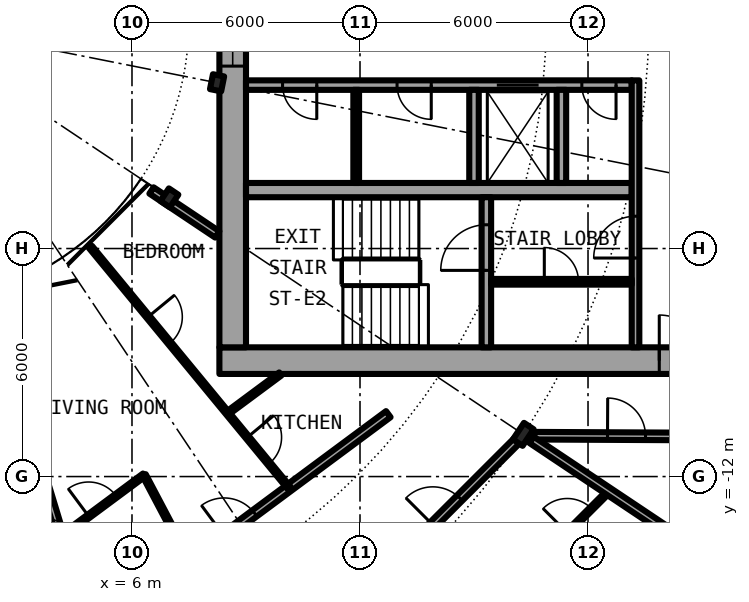
"""IFC4 building model, lengths in metres.
Left out: names, types, materials, properties, quantities, classifications, styles, units other than length and angle.
Written with IfcOpenShell. Run it as: python <this file> out.ifc"""

import sys

from ifc_helpers import new_model, si_unit, direction, frame, frame_2d, origin, origin_2d, place, context, subcontext, project, spatial, rectangle, i_section, extrude, element, fill, save


model = new_model("IFC4")
c1 = context("Model", 3, precision=1e-05, world=origin(), true_north=direction((0.0, 1.0)))
c2 = subcontext(c1, "Body", "Model", "MODEL_VIEW")
j1 = project(units=[si_unit("LENGTHUNIT", "METRE"), si_unit("PLANEANGLEUNIT", "RADIAN")], contexts=[c1])
p1 = place(None, origin())
s1 = spatial("IfcSite", under=j1, at=p1, CompositionType="ELEMENT")
p2 = place(p1, origin())
s2 = spatial("IfcBuilding", under=s1, at=p2, CompositionType="ELEMENT")
p3 = place(p2, frame((0.0, 0.0, 88.0)))
s3 = spatial("IfcBuildingStorey", under=s2, at=p3, CompositionType="ELEMENT", Elevation=88.0)
p4 = place(p3, frame((16.297, -10.889, 0.0), z_axis=(0.0, 0.0, 1.0), x_axis=(0.831469612303, -0.55557023302, 0.0)))
e1 = element("IfcColumn", 1, at=p4, inside=s3, PredefinedType="COLUMN", context=c2, shape_type="SweptSolid", body=[
    extrude(i_section(OverallWidth=0.306, OverallDepth=0.524, WebThickness=0.021, FlangeThickness=0.04, FilletRadius=0.027, at=origin_2d()), origin(), (0.0, 0.0, 1.0), 3.05),
])
for number, where, z_axis, x_axis in (
    (2, (6.984, -4.667, 0.0), (0.0, 0.0, 1.0), (0.831, -0.556, 0.0)),
    (3, (8.239, -1.639, 0.0), (0.0, 0.0, 1.0), (0.981, -0.195, 0.0)),
):
    element("IfcColumn", number, at=place(p3, frame(where, z_axis=z_axis, x_axis=x_axis)), inside=s3, PredefinedType="COLUMN", context=c2, shape_type="SweptSolid", body=[
        extrude(i_section(OverallWidth=0.3, OverallDepth=0.4, WebThickness=0.013, FlangeThickness=0.024, FilletRadius=0.027, at=origin_2d()), origin(), (0.0, 0.0, 1.0), 3.05),
    ])
p5 = place(p3, frame((8.3, -8.95, 0.0), z_axis=(0.0, 0.0, 1.0), x_axis=(1.0, 0.0, 0.0)))
e4 = element("IfcWall", 4, at=p5, inside=s3, PredefinedType="SHEAR", context=c2, shape_type="SweptSolid", body=[
    extrude(rectangle(XDim=14.0, YDim=0.7, at=frame_2d((7.0, 0.0))), origin(), (0.0, 0.0, 1.0), 3.05),
])
p6 = place(p5, frame((11.575, 0.0, 0.0)))
e5 = element("IfcOpeningElement", 5, at=p6, cuts=e4, PredefinedType="OPENING", context=c2, shape_type="SweptSolid", body=[
    extrude(rectangle(XDim=1.2, YDim=2.3, at=frame_2d((0.6, 1.15))), frame((0.0, 0.36, 0.0), z_axis=(0.0, -1.0, 0.0), x_axis=(1.0, 0.0, 0.0)), (0.0, 0.0, 1.0), 0.72),
])
p7 = place(p3, frame((8.65, -8.6, 0.0), z_axis=(0.0, 0.0, 1.0), x_axis=(0.0, 1.0, 0.0)))
e6 = element("IfcWall", 6, at=p7, inside=s3, PredefinedType="SHEAR", context=c2, shape_type="SweptSolid", body=[
    extrude(rectangle(XDim=17.2, YDim=0.7, at=frame_2d((8.6, 0.0))), origin(), (0.0, 0.0, 1.0), 3.05),
])
p8 = place(p7, frame((7.4, 0.0, 0.1)))
e7 = element("IfcOpeningElement", 7, at=p8, cuts=e6, PredefinedType="OPENING", context=c2, shape_type="SweptSolid", body=[
    extrude(rectangle(XDim=2.4, YDim=2.2, at=frame_2d((1.2, 1.1))), frame((0.0, 0.36, 0.0), z_axis=(0.0, -1.0, 0.0), x_axis=(1.0, 0.0, 0.0)), (0.0, 0.0, 1.0), 0.72),
])
p9 = place(p3, frame((19.15, -1.7, 0.0), z_axis=(0.0, 0.0, 1.0), x_axis=(-1.0, 0.0, 0.0)))
e8 = element("IfcWall", 8, at=p9, inside=s3, PredefinedType="SHEAR", context=c2, shape_type="SweptSolid", body=[
    extrude(rectangle(XDim=10.15, YDim=0.25, at=frame_2d((5.075, 0.0))), origin(), (0.0, 0.0, 1.0), 3.05),
])
p10 = place(p9, frame((2.45, 0.0, 0.0)))
e9 = element("IfcOpeningElement", 9, at=p10, cuts=e8, PredefinedType="OPENING", context=c2, shape_type="SweptSolid", body=[
    extrude(rectangle(XDim=1.1, YDim=2.3, at=frame_2d((0.55, 1.15))), frame((0.0, 0.135, 0.0), z_axis=(0.0, -1.0, 0.0), x_axis=(1.0, 0.0, 0.0)), (0.0, 0.0, 1.0), 0.27),
])
p11 = place(p9, frame((8.288, 0.0, 0.0)))
e10 = element("IfcOpeningElement", 10, at=p11, cuts=e8, PredefinedType="OPENING", context=c2, shape_type="SweptSolid", body=[
    extrude(rectangle(XDim=0.9, YDim=2.3, at=frame_2d((0.45, 1.15))), frame((0.0, 0.135, 0.0), z_axis=(0.0, -1.0, 0.0), x_axis=(1.0, 0.0, 0.0)), (0.0, 0.0, 1.0), 0.27),
])
p12 = place(p9, frame((5.275, 0.0, 0.0)))
e11 = element("IfcOpeningElement", 11, at=p12, cuts=e8, PredefinedType="OPENING", context=c2, shape_type="SweptSolid", body=[
    extrude(rectangle(XDim=0.9, YDim=2.3, at=frame_2d((0.45, 1.15))), frame((0.0, 0.135, 0.0), z_axis=(0.0, -1.0, 0.0), x_axis=(1.0, 0.0, 0.0)), (0.0, 0.0, 1.0), 0.27),
])
p13 = place(p9, frame((0.413, 0.0, 0.0)))
e12 = element("IfcOpeningElement", 12, at=p13, cuts=e8, PredefinedType="OPENING", context=c2, shape_type="SweptSolid", body=[
    extrude(rectangle(XDim=0.9, YDim=2.3, at=frame_2d((0.45, 1.15))), frame((0.0, 0.135, 0.0), z_axis=(0.0, -1.0, 0.0), x_axis=(1.0, 0.0, 0.0)), (0.0, 0.0, 1.0), 0.27),
])
p14 = place(p3, frame((9.0, -4.462, 0.0), z_axis=(0.0, 0.0, 1.0), x_axis=(1.0, 0.0, 0.0)))
e13 = element("IfcWall", 13, at=p14, inside=s3, PredefinedType="SHEAR", context=c2, shape_type="SweptSolid", body=[
    extrude(rectangle(XDim=10.15, YDim=0.375, at=frame_2d((5.075, 0.0))), origin(), (0.0, 0.0, 1.0), 3.05),
])
p15 = place(p3, frame((15.325, -8.6, 0.0), z_axis=(0.0, 0.0, 1.0), x_axis=(0.0, 1.0, 0.0)))
e14 = element("IfcWall", 14, at=p15, inside=s3, PredefinedType="SHEAR", context=c2, shape_type="SweptSolid", body=[
    extrude(rectangle(XDim=3.95, YDim=0.25, at=frame_2d((1.975, 0.0))), origin(), (0.0, 0.0, 1.0), 3.05),
])
p16 = place(p15, frame((2.025, 0.0, 0.0)))
e15 = element("IfcOpeningElement", 15, at=p16, cuts=e14, PredefinedType="OPENING", context=c2, shape_type="SweptSolid", body=[
    extrude(rectangle(XDim=1.2, YDim=2.3, at=frame_2d((0.6, 1.15))), frame((0.0, 0.135, 0.0), z_axis=(0.0, -1.0, 0.0), x_axis=(1.0, 0.0, 0.0)), (0.0, 0.0, 1.0), 0.27),
])
for number, where, z_axis, x_axis in (
    (16, (15.0, -1.825, 0.0), (0.0, 0.0, 1.0), (0.0, -1.0, 0.0)),
    (17, (17.3, -1.825, 0.0), (0.0, 0.0, 1.0), (0.0, -1.0, 0.0)),
):
    element("IfcWall", number, at=place(p3, frame(where, z_axis=z_axis, x_axis=x_axis)), inside=s3, PredefinedType="SOLIDWALL", context=c2, shape_type="SweptSolid", body=[
        extrude(rectangle(XDim=2.45, YDim=0.25, at=frame_2d((1.225, 0.0))), origin(), (0.0, 0.0, 1.0), 2.7),
    ])
p17 = place(p3, frame((19.25, -8.6, 0.0), z_axis=(0.0, 0.0, 1.0), x_axis=(0.0, 1.0, 0.0)))
e18 = element("IfcWall", 18, at=p17, inside=s3, PredefinedType="SOLIDWALL", context=c2, shape_type="SweptSolid", body=[
    extrude(rectangle(XDim=7.025, YDim=0.2, at=frame_2d((3.513, 0.0))), origin(), (0.0, 0.0, 1.0), 2.7),
])
p18 = place(p17, frame((2.35, 0.0, 0.0)))
e19 = element("IfcOpeningElement", 19, at=p18, cuts=e18, PredefinedType="OPENING", context=c2, shape_type="SweptSolid", body=[
    extrude(rectangle(XDim=1.1, YDim=2.3, at=frame_2d((0.55, 1.15))), frame((0.0, 0.11, 0.0), z_axis=(0.0, -1.0, 0.0), x_axis=(1.0, 0.0, 0.0)), (0.0, 0.0, 1.0), 0.22),
])
p19 = place(p3, frame((11.9, -1.825, 0.0), z_axis=(0.0, 0.0, 1.0), x_axis=(0.0, -1.0, 0.0)))
e20 = element("IfcWall", 20, at=p19, inside=s3, PredefinedType="PARTITIONING", context=c2, shape_type="SweptSolid", body=[
    extrude(rectangle(XDim=2.45, YDim=0.15, at=frame_2d((1.225, 0.0))), origin(), (0.0, 0.0, 1.0), 2.7),
])
p20 = place(p3, frame((15.45, -6.875, 0.0), z_axis=(0.0, 0.0, 1.0), x_axis=(1.0, 0.0, 0.0)))
e21 = element("IfcWall", 21, at=p20, inside=s3, PredefinedType="PARTITIONING", context=c2, shape_type="SweptSolid", body=[
    extrude(rectangle(XDim=3.7, YDim=0.15, at=frame_2d((1.85, 0.0))), origin(), (0.0, 0.0, 1.0), 2.7),
])
p21 = place(p20, frame((1.4, 0.0, 0.0)))
e22 = element("IfcOpeningElement", 22, at=p21, cuts=e21, PredefinedType="OPENING", context=c2, shape_type="SweptSolid", body=[
    extrude(rectangle(XDim=0.9, YDim=2.3, at=frame_2d((0.45, 1.15))), frame((0.0, 0.085, 0.0), z_axis=(0.0, -1.0, 0.0), x_axis=(1.0, 0.0, 0.0)), (0.0, 0.0, 1.0), 0.17),
])
p22 = place(p3, frame((15.468, -15.463, 0.0), z_axis=(0.0, 0.0, 1.0), x_axis=(0.707106781187, 0.707106781187, 0.0)))
e23 = element("IfcWall", 23, at=p22, inside=s3, PredefinedType="PARTITIONING", context=c2, shape_type="SweptSolid", body=[
    extrude(rectangle(XDim=4.351, YDim=0.1, at=frame_2d((2.176, 0.0))), origin(), (0.0, 0.0, 1.0), 2.7),
])
p23 = place(p22, frame((2.808, 0.0, 0.0)))
e24 = element("IfcOpeningElement", 24, at=p23, cuts=e23, PredefinedType="OPENING", context=c2, shape_type="SweptSolid", body=[
    extrude(rectangle(XDim=0.9, YDim=2.3, at=frame_2d((0.45, 1.15))), frame((0.0, 0.06, 0.0), z_axis=(0.0, -1.0, 0.0), x_axis=(1.0, 0.0, 0.0)), (0.0, 0.0, 1.0), 0.12),
])
p24 = place(p3, frame((11.0, -16.186, 0.0), z_axis=(0.0, 0.0, 1.0), x_axis=(0.707106781187, 0.707106781187, 0.0)))
e25 = element("IfcWall", 25, at=p24, inside=s3, PredefinedType="PARTITIONING", context=c2, shape_type="SweptSolid", body=[
    extrude(rectangle(XDim=7.334, YDim=0.2, at=frame_2d((3.667, 0.0))), origin(), (0.0, 0.0, 1.0), 2.38),
])
p25 = place(p24, frame((4.123, 0.0, 0.0)))
e26 = element("IfcOpeningElement", 26, at=p25, cuts=e25, PredefinedType="OPENING", context=c2, shape_type="SweptSolid", body=[
    extrude(rectangle(XDim=1.0, YDim=2.3, at=frame_2d((0.5, 1.15))), frame((0.0, 0.11, 0.0), z_axis=(0.0, -1.0, 0.0), x_axis=(1.0, 0.0, 0.0)), (0.0, 0.0, 1.0), 0.22),
])
p26 = place(p3, frame((4.906, -16.172, 0.0), z_axis=(0.0, 0.0, 1.0), x_axis=(0.803191461888, 0.595720971219, 0.0)))
e27 = element("IfcWall", 27, at=p26, inside=s3, PredefinedType="PARTITIONING", context=c2, shape_type="SweptSolid", body=[
    extrude(rectangle(XDim=9.76, YDim=0.2, at=frame_2d((4.88, 0.0))), origin(), (0.0, 0.0, 1.0), 2.7),
])
p27 = place(p26, frame((4.38, 0.0, 0.0)))
e28 = element("IfcOpeningElement", 28, at=p27, cuts=e27, PredefinedType="OPENING", context=c2, shape_type="SweptSolid", body=[
    extrude(rectangle(XDim=1.0, YDim=2.3, at=frame_2d((0.5, 1.15))), frame((0.0, 0.11, 0.0), z_axis=(0.0, -1.0, 0.0), x_axis=(1.0, 0.0, 0.0)), (0.0, 0.0, 1.0), 0.22),
])
p28 = place(p3, frame((4.123, -13.589, 0.0), z_axis=(0.0, 0.0, 1.0), x_axis=(0.803128348509, 0.595806055542, 0.0)))
e29 = element("IfcWall", 29, at=p28, inside=s3, PredefinedType="PARTITIONING", context=c2, shape_type="SweptSolid", body=[
    extrude(rectangle(XDim=2.734, YDim=0.1, at=frame_2d((1.367, 0.0))), origin(), (0.0, 0.0, 1.0), 2.7),
])
p29 = place(p28, frame((0.916, 0.0, 0.0)))
e30 = element("IfcOpeningElement", 30, at=p29, cuts=e29, PredefinedType="OPENING", context=c2, shape_type="SweptSolid", body=[
    extrude(rectangle(XDim=0.9, YDim=2.3, at=frame_2d((0.45, 1.15))), frame((0.0, 0.06, 0.0), z_axis=(0.0, -1.0, 0.0), x_axis=(1.0, 0.0, 0.0)), (0.0, 0.0, 1.0), 0.12),
])
p30 = place(p3, frame((8.513, -10.332, 0.0), z_axis=(0.0, 0.0, 1.0), x_axis=(0.803135014325, 0.595797070121, 0.0)))
e31 = element("IfcWall", 31, at=p30, inside=s3, PredefinedType="PARTITIONING", context=c2, shape_type="SweptSolid", body=[
    extrude(rectangle(XDim=1.732, YDim=0.1, at=frame_2d((0.866, 0.0))), origin(), (0.0, 0.0, 1.0), 2.7),
])
p31 = place(p3, frame((16.588, -10.925, 0.0), z_axis=(0.0, 0.0, 1.0), x_axis=(0.999988019025, -0.004895079807, 0.0)))
e32 = element("IfcWall", 32, at=p31, inside=s3, PredefinedType="PARTITIONING", context=c2, shape_type="SweptSolid", body=[
    extrude(rectangle(XDim=5.087, YDim=0.2, at=frame_2d((2.543, 0.0))), origin(), (0.0, 0.0, 1.0), 2.7),
])
p32 = place(p31, frame((1.925, 0.0, 0.0)))
e33 = element("IfcOpeningElement", 33, at=p32, cuts=e32, PredefinedType="OPENING", context=c2, shape_type="SweptSolid", body=[
    extrude(rectangle(XDim=1.0, YDim=2.3, at=frame_2d((0.5, 1.15))), frame((0.0, 0.11, 0.0), z_axis=(0.0, -1.0, 0.0), x_axis=(1.0, 0.0, 0.0)), (0.0, 0.0, 1.0), 0.22),
])
p33 = place(p3, frame((6.513, -4.472, 0.0), z_axis=(0.0, 0.0, 1.0), x_axis=(0.831382204863, -0.555701025225, 0.0)))
e34 = element("IfcWall", 34, at=p33, inside=s3, PredefinedType="PARTITIONING", context=c2, shape_type="SweptSolid", body=[
    extrude(rectangle(XDim=2.082, YDim=0.2, at=frame_2d((1.041, 0.0))), origin(), (0.0, 0.0, 1.0), 2.7),
])
p34 = place(p3, frame((2.242, -7.388, 0.0), z_axis=(0.0, 0.0, 1.0), x_axis=(0.290225889812, -0.956958166736, 0.0)))
e35 = element("IfcWall", 35, at=p34, inside=s3, PredefinedType="PARTITIONING", context=c2, shape_type="SweptSolid", body=[
    extrude(rectangle(XDim=9.179, YDim=0.2, at=frame_2d((4.59, 0.0))), origin(), (0.0, 0.0, 1.0), 2.7),
])
p35 = place(p3, frame((4.908, -5.959, 0.0), z_axis=(0.0, 0.0, 1.0), x_axis=(0.636105207978, -0.771602335652, 0.0)))
e36 = element("IfcWall", 36, at=p35, inside=s3, PredefinedType="PARTITIONING", context=c2, shape_type="SweptSolid", body=[
    extrude(rectangle(XDim=8.213, YDim=0.1, at=frame_2d((4.106, 0.0))), origin(), (0.0, 0.0, 1.0), 2.7),
])
p36 = place(p35, frame((6.49, 0.0, 0.0)))
e37 = element("IfcOpeningElement", 37, at=p36, cuts=e36, PredefinedType="OPENING", context=c2, shape_type="SweptSolid", body=[
    extrude(rectangle(XDim=0.9, YDim=2.3, at=frame_2d((0.45, 1.15))), frame((0.0, 0.06, 0.0), z_axis=(0.0, -1.0, 0.0), x_axis=(1.0, 0.0, 0.0)), (0.0, 0.0, 1.0), 0.12),
])
p37 = place(p35, frame((2.384, 0.0, 0.0)))
e38 = element("IfcOpeningElement", 38, at=p37, cuts=e36, PredefinedType="OPENING", context=c2, shape_type="SweptSolid", body=[
    extrude(rectangle(XDim=0.9, YDim=2.3, at=frame_2d((0.45, 1.15))), frame((0.0, 0.06, 0.0), z_axis=(0.0, -1.0, 0.0), x_axis=(1.0, 0.0, 0.0)), (0.0, 0.0, 1.0), 0.12),
])
p38 = place(p3, frame((6.317, -11.96, 0.0), z_axis=(0.0, 0.0, 1.0), x_axis=(0.466880254022, -0.884320546185, 0.0)))
e39 = element("IfcWall", 39, at=p38, inside=s3, PredefinedType="PARTITIONING", context=c2, shape_type="SweptSolid", body=[
    extrude(rectangle(XDim=2.573, YDim=0.1, at=frame_2d((1.286, 0.0))), origin(), (0.0, 0.0, 1.0), 2.7),
])
p39 = place(p3, frame((16.515, -11.035, 0.0), z_axis=(0.0, 0.0, 1.0), x_axis=(0.831505405283, -0.555516661303, 0.0)))
e40 = element("IfcWall", 40, at=p39, inside=s3, PredefinedType="PARTITIONING", context=c2, shape_type="SweptSolid", body=[
    extrude(rectangle(XDim=7.312, YDim=0.2, at=frame_2d((3.656, 0.0))), origin(), (0.0, 0.0, 1.0), 2.7),
])
p40 = place(p10, origin())
e41 = element("IfcDoor", 41, at=p40, inside=s3, OperationType="DOUBLE_DOOR_SLIDING", PredefinedType="DOOR", context=c2, shape_type="SweptSolid", body=[
    extrude(rectangle(XDim=1.1, YDim=2.3, at=frame_2d((0.55, 1.15))), frame((0.0, 0.025, 0.0), z_axis=(0.0, -1.0, 0.0), x_axis=(1.0, 0.0, 0.0)), (0.0, 0.0, 1.0), 0.05),
])
fill(e9, e41)
p41 = place(p11, origin())
e42 = element("IfcDoor", 42, at=p41, inside=s3, OperationType="SINGLE_SWING_LEFT", PredefinedType="DOOR", context=c2, shape_type="SweptSolid", body=[
    extrude(rectangle(XDim=0.9, YDim=2.3, at=frame_2d((0.45, 1.15))), frame((0.0, 0.025, 0.0), z_axis=(0.0, -1.0, 0.0), x_axis=(1.0, 0.0, 0.0)), (0.0, 0.0, 1.0), 0.05),
])
fill(e10, e42)
p42 = place(p12, origin())
e43 = element("IfcDoor", 43, at=p42, inside=s3, OperationType="SINGLE_SWING_LEFT", PredefinedType="DOOR", context=c2, shape_type="SweptSolid", body=[
    extrude(rectangle(XDim=0.9, YDim=2.3, at=frame_2d((0.45, 1.15))), frame((0.0, 0.025, 0.0), z_axis=(0.0, -1.0, 0.0), x_axis=(1.0, 0.0, 0.0)), (0.0, 0.0, 1.0), 0.05),
])
fill(e11, e43)
p43 = place(p13, origin())
e44 = element("IfcDoor", 44, at=p43, inside=s3, OperationType="SINGLE_SWING_RIGHT", PredefinedType="DOOR", context=c2, shape_type="SweptSolid", body=[
    extrude(rectangle(XDim=0.9, YDim=2.3, at=frame_2d((0.45, 1.15))), frame((0.0, 0.025, 0.0), z_axis=(0.0, -1.0, 0.0), x_axis=(1.0, 0.0, 0.0)), (0.0, 0.0, 1.0), 0.05),
])
fill(e12, e44)
p44 = place(p21, origin())
e45 = element("IfcDoor", 45, at=p44, inside=s3, OperationType="SINGLE_SWING_LEFT", PredefinedType="DOOR", context=c2, shape_type="SweptSolid", body=[
    extrude(rectangle(XDim=0.9, YDim=2.3, at=frame_2d((0.45, 1.15))), frame((0.0, 0.025, 0.0), z_axis=(0.0, -1.0, 0.0), x_axis=(1.0, 0.0, 0.0)), (0.0, 0.0, 1.0), 0.05),
])
fill(e22, e45)
p45 = place(p16, origin())
e46 = element("IfcDoor", 46, at=p45, inside=s3, OperationType="SINGLE_SWING_LEFT", PredefinedType="DOOR", context=c2, shape_type="SweptSolid", body=[
    extrude(rectangle(XDim=1.2, YDim=2.3, at=frame_2d((0.6, 1.15))), frame((0.0, 0.025, 0.0), z_axis=(0.0, -1.0, 0.0), x_axis=(1.0, 0.0, 0.0)), (0.0, 0.0, 1.0), 0.05),
])
fill(e15, e46)
p46 = place(p18, origin())
e47 = element("IfcDoor", 47, at=p46, inside=s3, OperationType="SINGLE_SWING_RIGHT", PredefinedType="DOOR", context=c2, shape_type="SweptSolid", body=[
    extrude(rectangle(XDim=1.1, YDim=2.3, at=frame_2d((0.55, 1.15))), frame((0.0, 0.025, 0.0), z_axis=(0.0, -1.0, 0.0), x_axis=(1.0, 0.0, 0.0)), (0.0, 0.0, 1.0), 0.05),
])
fill(e19, e47)
p47 = place(p6, origin())
e48 = element("IfcDoor", 48, at=p47, inside=s3, OperationType="SINGLE_SWING_LEFT", PredefinedType="DOOR", context=c2, shape_type="SweptSolid", body=[
    extrude(rectangle(XDim=1.2, YDim=2.3, at=frame_2d((0.6, 1.15))), frame((0.0, 0.025, 0.0), z_axis=(0.0, -1.0, 0.0), x_axis=(1.0, 0.0, 0.0)), (0.0, 0.0, 1.0), 0.05),
])
fill(e5, e48)
p48 = place(p8, origin())
e49 = element("IfcWindow", 49, at=p48, inside=s3, PartitioningType="SINGLE_PANEL", PredefinedType="WINDOW", context=c2, shape_type="SweptSolid", body=[
    extrude(rectangle(XDim=2.4, YDim=2.2, at=frame_2d((1.2, 1.1))), frame((0.0, 0.03, 0.0), z_axis=(0.0, -1.0, 0.0), x_axis=(1.0, 0.0, 0.0)), (0.0, 0.0, 1.0), 0.06),
])
fill(e7, e49)
p49 = place(p25, origin())
e50 = element("IfcDoor", 50, at=p49, inside=s3, OperationType="SINGLE_SWING_RIGHT", PredefinedType="DOOR", context=c2, shape_type="SweptSolid", body=[
    extrude(rectangle(XDim=1.0, YDim=2.3, at=frame_2d((0.5, 1.15))), frame((0.0, 0.025, 0.0), z_axis=(0.0, -1.0, 0.0), x_axis=(1.0, 0.0, 0.0)), (0.0, 0.0, 1.0), 0.05),
])
fill(e26, e50)
p50 = place(p23, origin())
e51 = element("IfcDoor", 51, at=p50, inside=s3, OperationType="SINGLE_SWING_RIGHT", PredefinedType="DOOR", context=c2, shape_type="SweptSolid", body=[
    extrude(rectangle(XDim=0.9, YDim=2.3, at=frame_2d((0.45, 1.15))), frame((0.0, 0.025, 0.0), z_axis=(0.0, -1.0, 0.0), x_axis=(1.0, 0.0, 0.0)), (0.0, 0.0, 1.0), 0.05),
])
fill(e24, e51)
p51 = place(p27, origin())
e52 = element("IfcDoor", 52, at=p51, inside=s3, OperationType="SINGLE_SWING_LEFT", PredefinedType="DOOR", context=c2, shape_type="SweptSolid", body=[
    extrude(rectangle(XDim=1.0, YDim=2.3, at=frame_2d((0.5, 1.15))), frame((0.0, 0.025, 0.0), z_axis=(0.0, -1.0, 0.0), x_axis=(1.0, 0.0, 0.0)), (0.0, 0.0, 1.0), 0.05),
])
fill(e28, e52)
p52 = place(p29, origin())
e53 = element("IfcDoor", 53, at=p52, inside=s3, OperationType="SINGLE_SWING_LEFT", PredefinedType="DOOR", context=c2, shape_type="SweptSolid", body=[
    extrude(rectangle(XDim=0.9, YDim=2.3, at=frame_2d((0.45, 1.15))), frame((0.0, 0.025, 0.0), z_axis=(0.0, -1.0, 0.0), x_axis=(1.0, 0.0, 0.0)), (0.0, 0.0, 1.0), 0.05),
])
fill(e30, e53)
p53 = place(p36, origin())
e54 = element("IfcDoor", 54, at=p53, inside=s3, OperationType="SINGLE_SWING_RIGHT", PredefinedType="DOOR", context=c2, shape_type="SweptSolid", body=[
    extrude(rectangle(XDim=0.9, YDim=2.3, at=frame_2d((0.45, 1.15))), frame((0.0, 0.025, 0.0), z_axis=(0.0, -1.0, 0.0), x_axis=(1.0, 0.0, 0.0)), (0.0, 0.0, 1.0), 0.05),
])
fill(e37, e54)
p54 = place(p37, origin())
e55 = element("IfcDoor", 55, at=p54, inside=s3, OperationType="SINGLE_SWING_LEFT", PredefinedType="DOOR", context=c2, shape_type="SweptSolid", body=[
    extrude(rectangle(XDim=0.9, YDim=2.3, at=frame_2d((0.45, 1.15))), frame((0.0, 0.025, 0.0), z_axis=(0.0, -1.0, 0.0), x_axis=(1.0, 0.0, 0.0)), (0.0, 0.0, 1.0), 0.05),
])
fill(e38, e55)
p55 = place(p32, origin())
e56 = element("IfcDoor", 56, at=p55, inside=s3, OperationType="SINGLE_SWING_LEFT", PredefinedType="DOOR", context=c2, shape_type="SweptSolid", body=[
    extrude(rectangle(XDim=1.0, YDim=2.3, at=frame_2d((0.5, 1.15))), frame((0.0, 0.025, 0.0), z_axis=(0.0, -1.0, 0.0), x_axis=(1.0, 0.0, 0.0)), (0.0, 0.0, 1.0), 0.05),
])
fill(e33, e56)
save(model, sys.argv[1])
